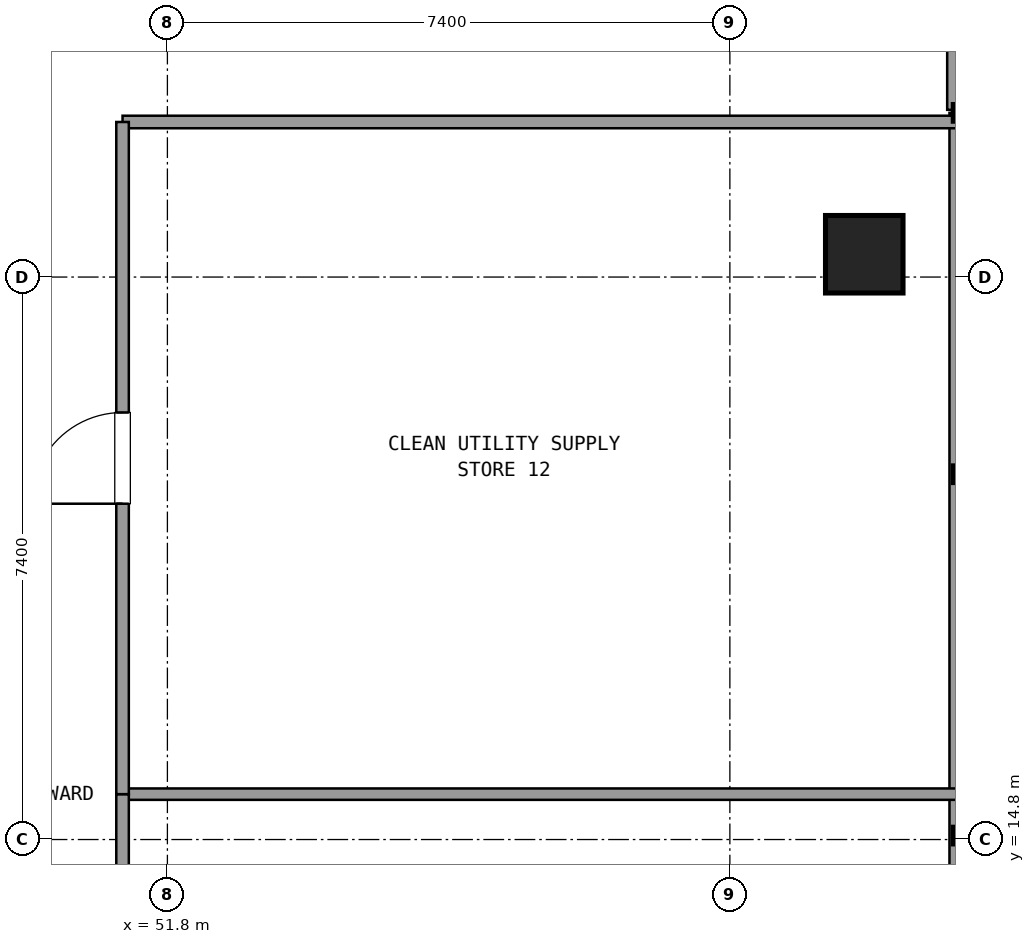
"""IFC4 building model, lengths in metres.
Left out: names, types, materials, properties, quantities, classifications, styles, units other than length and angle.
Written with IfcOpenShell. Run it as: python <this file> out.ifc"""

import sys

from ifc_helpers import new_model, si_unit, direction, frame, frame_2d, origin, origin_2d, place, context, subcontext, project, spatial, rectangle, extrude, element, fill, save


model = new_model("IFC4")
c1 = context("Model", 3, precision=1e-05, world=origin(), true_north=direction((0.0, 1.0)))
c2 = subcontext(c1, "Body", "Model", "MODEL_VIEW")
j1 = project(units=[si_unit("LENGTHUNIT", "METRE"), si_unit("PLANEANGLEUNIT", "RADIAN")], contexts=[c1])
p1 = place(None, origin())
s1 = spatial("IfcSite", under=j1, at=p1, CompositionType="ELEMENT")
p2 = place(p1, origin())
s2 = spatial("IfcBuilding", under=s1, at=p2, CompositionType="ELEMENT")
p3 = place(p2, frame((0.0, 0.0, 106.38)))
s3 = spatial("IfcBuildingStorey", under=s2, at=p3, CompositionType="ELEMENT", Elevation=106.38)
p4 = place(p3, frame((60.968, 22.5, 0.021), z_axis=(-0.084573087246, 0.0, 0.99641727851), x_axis=(0.0, -1.0, 0.0)))
e1 = element("IfcColumn", 1, at=p4, inside=s3, PredefinedType="COLUMN", context=c2, shape_type="SweptSolid", body=[
    extrude(rectangle(XDim=1.02, YDim=1.02, at=origin_2d()), origin(), (0.0, 0.0, 1.0), 3.571),
])
p5 = place(p3, frame((62.209, 24.4, 0.0), z_axis=(0.0, 0.0, 1.0), x_axis=(0.0, 1.0, 0.0)))
e2 = element("IfcWall", 2, at=p5, inside=s3, PredefinedType="SOLIDWALL", context=c2, shape_type="SweptSolid", body=[
    extrude(rectangle(XDim=3.0, YDim=0.3, at=frame_2d((1.5, 0.0))), origin(), (0.0, 0.0, 1.0), 2.67),
])
p6 = place(p5, frame((0.9, 0.0, 0.0)))
e3 = element("IfcOpeningElement", 3, at=p6, cuts=e2, PredefinedType="OPENING", context=c2, shape_type="SweptSolid", body=[
    extrude(rectangle(XDim=1.2, YDim=2.2, at=frame_2d((0.6, 1.1))), frame((0.0, 0.16, 0.0), z_axis=(0.0, -1.0, 0.0), x_axis=(1.0, 0.0, 0.0)), (0.0, 0.0, 1.0), 0.32),
])
p7 = place(p3, frame((62.209, 10.098, 0.0), z_axis=(0.0, 0.0, 1.0), x_axis=(0.0, 1.0, 0.0)))
e4 = element("IfcWall", 4, at=p7, inside=s3, PredefinedType="SOLIDWALL", context=c2, shape_type="SweptSolid", body=[
    extrude(rectangle(XDim=14.262, YDim=0.24, at=frame_2d((7.131, 0.0))), origin(), (0.0, 0.0, 1.0), 0.85),
])
p8 = place(p3, frame((51.21, 24.24, 0.0), z_axis=(0.0, 0.0, 1.0), x_axis=(1.0, 0.0, 0.0)))
e5 = element("IfcWall", 5, at=p8, inside=s3, PredefinedType="PARTITIONING", context=c2, shape_type="SweptSolid", body=[
    extrude(rectangle(XDim=10.979, YDim=0.165, at=frame_2d((5.49, 0.0))), origin(), (0.0, 0.0, 1.0), 2.61),
])
p9 = place(p3, frame((51.21, 15.397, 0.0), z_axis=(0.0, 0.0, 1.0), x_axis=(1.0, 0.0, 0.0)))
e6 = element("IfcWall", 6, at=p9, inside=s3, PredefinedType="PARTITIONING", context=c2, shape_type="SweptSolid", body=[
    extrude(rectangle(XDim=10.979, YDim=0.15, at=frame_2d((5.49, 0.0))), origin(), (0.0, 0.0, 1.0), 2.61),
])
p10 = place(p3, frame((51.21, 4.142, 0.0), z_axis=(0.0, 0.0, 1.0), x_axis=(0.0, 1.0, 0.0)))
e7 = element("IfcWall", 7, at=p10, inside=s3, PredefinedType="PARTITIONING", context=c2, shape_type="SweptSolid", body=[
    extrude(rectangle(XDim=11.255, YDim=0.165, at=frame_2d((5.627, 0.0))), origin(), (0.0, 0.0, 1.0), 2.61),
])
p11 = place(p10, frame((5.027, 0.0, 0.0)))
e8 = element("IfcOpeningElement", 8, at=p11, cuts=e7, PredefinedType="OPENING", context=c2, shape_type="SweptSolid", body=[
    extrude(rectangle(XDim=1.2, YDim=2.15, at=frame_2d((0.6, 1.075))), frame((0.0, 0.093, 0.0), z_axis=(0.0, -1.0, 0.0), x_axis=(1.0, 0.0, 0.0)), (0.0, 0.0, 1.0), 0.185),
])
p12 = place(p3, frame((51.21, 15.397, 0.0), z_axis=(0.0, 0.0, 1.0), x_axis=(0.0, 1.0, 0.0)))
e9 = element("IfcWall", 9, at=p12, inside=s3, PredefinedType="PARTITIONING", context=c2, shape_type="SweptSolid", body=[
    extrude(rectangle(XDim=8.843, YDim=0.165, at=frame_2d((4.421, 0.0))), origin(), (0.0, 0.0, 1.0), 2.61),
])
p13 = place(p12, frame((3.821, 0.0, 0.0)))
e10 = element("IfcOpeningElement", 10, at=p13, cuts=e9, PredefinedType="OPENING", context=c2, shape_type="SweptSolid", body=[
    extrude(rectangle(XDim=1.2, YDim=2.15, at=frame_2d((0.6, 1.075))), frame((0.0, 0.093, 0.0), z_axis=(0.0, -1.0, 0.0), x_axis=(1.0, 0.0, 0.0)), (0.0, 0.0, 1.0), 0.185),
])
p14 = place(p13, origin())
e11 = element("IfcDoor", 11, at=p14, inside=s3, OperationType="SINGLE_SWING_LEFT", PredefinedType="DOOR", context=c2, shape_type="SweptSolid", body=[
    extrude(rectangle(XDim=1.2, YDim=2.15, at=frame_2d((0.6, 1.075))), frame((0.0, 0.025, 0.0), z_axis=(0.0, -1.0, 0.0), x_axis=(1.0, 0.0, 0.0)), (0.0, 0.0, 1.0), 0.05),
])
fill(e10, e11)
save(model, sys.argv[1])
